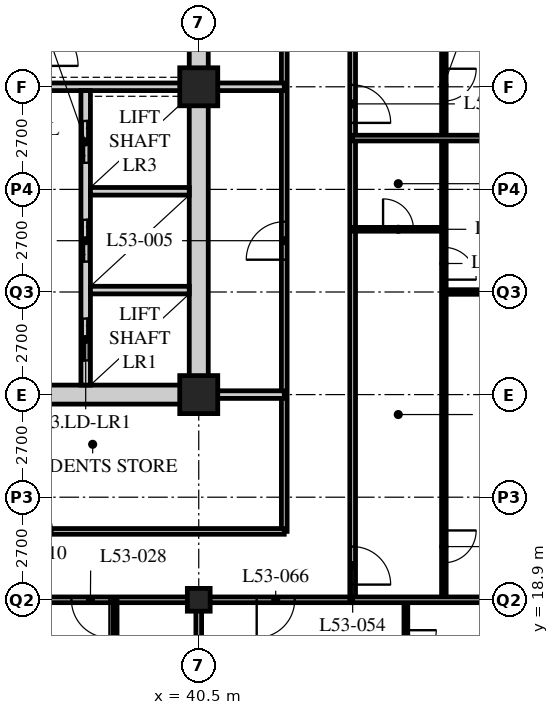
"""IFC4 building model, lengths in metres.
Left out: names, types, materials, properties, quantities, classifications, styles, units other than length and angle.
Written with IfcOpenShell. Run it as: python <this file> out.ifc"""

import sys

from ifc_helpers import new_model, si_unit, direction, frame, frame_2d, origin, origin_2d, place, context, subcontext, project, spatial, rectangle, hollow_rectangle, extrude, element, fill, save


model = new_model("IFC4")
c1 = context("Model", 3, precision=1e-05, world=origin(), true_north=direction((0.0, 1.0)))
c2 = subcontext(c1, "Body", "Model", "MODEL_VIEW")
j1 = project(units=[si_unit("LENGTHUNIT", "METRE"), si_unit("PLANEANGLEUNIT", "RADIAN")], contexts=[c1])
p1 = place(None, origin())
s1 = spatial("IfcSite", under=j1, at=p1, CompositionType="ELEMENT")
p2 = place(p1, origin())
s2 = spatial("IfcBuilding", under=s1, at=p2, CompositionType="ELEMENT")
p3 = place(p2, frame((0.0, 0.0, 206.4)))
s3 = spatial("IfcBuildingStorey", under=s2, at=p3, CompositionType="ELEMENT", Elevation=206.4)
p4 = place(p3, frame((40.5, 18.9, 0.0), z_axis=(0.0, 0.0, 1.0), x_axis=(1.0, 0.0, 0.0)))
e1 = element("IfcColumn", 1, at=p4, inside=s3, PredefinedType="COLUMN", context=c2, shape_type="SweptSolid", body=[
    extrude(hollow_rectangle(XDim=0.6, YDim=0.6, WallThickness=0.05, at=origin_2d()), origin(), (0.0, 0.0, 1.0), 3.6),
])
for number, where, z_axis, x_axis in (
    (2, (40.5, 24.3, 0.0), (0.0, 0.0, 1.0), (1.0, 0.0, 0.0)),
    (3, (40.5, 32.4, 0.0), (0.0, 0.0, 1.0), (1.0, 0.0, 0.0)),
):
    element("IfcColumn", number, at=place(p3, frame(where, z_axis=z_axis, x_axis=x_axis)), inside=s3, PredefinedType="COLUMN", context=c2, shape_type="SweptSolid", body=[
        extrude(hollow_rectangle(XDim=1.0, YDim=1.0, WallThickness=0.1, at=origin_2d()), origin(), (0.0, 0.0, 1.0), 3.6),
    ])
p5 = place(p3, frame((8.1, 18.9, 0.0), z_axis=(0.0, 0.0, 1.0), x_axis=(1.0, 0.0, 0.0)))
e4 = element("IfcWall", 4, at=p5, inside=s3, PredefinedType="PARTITIONING", context=c2, shape_type="SweptSolid", body=[
    extrude(rectangle(XDim=36.45, YDim=0.15, at=frame_2d((18.225, 0.0))), origin(), (0.0, 0.0, 1.0), 2.778),
])
p6 = place(p5, frame((4.45, 0.0, 0.0)))
e5 = element("IfcOpeningElement", 5, at=p6, cuts=e4, PredefinedType="OPENING", context=c2, shape_type="SweptSolid", body=[
    extrude(rectangle(XDim=1.0, YDim=2.1, at=frame_2d((0.5, 1.05))), frame((0.0, 0.085, 0.0), z_axis=(0.0, -1.0, 0.0), x_axis=(1.0, 0.0, 0.0)), (0.0, 0.0, 1.0), 0.17),
])
p7 = place(p5, frame((12.55, 0.0, 0.0)))
e6 = element("IfcOpeningElement", 6, at=p7, cuts=e4, PredefinedType="OPENING", context=c2, shape_type="SweptSolid", body=[
    extrude(rectangle(XDim=1.0, YDim=2.1, at=frame_2d((0.5, 1.05))), frame((0.0, 0.085, 0.0), z_axis=(0.0, -1.0, 0.0), x_axis=(1.0, 0.0, 0.0)), (0.0, 0.0, 1.0), 0.17),
])
p8 = place(p5, frame((29.05, 0.0, 0.0)))
e7 = element("IfcOpeningElement", 7, at=p8, cuts=e4, PredefinedType="OPENING", context=c2, shape_type="SweptSolid", body=[
    extrude(rectangle(XDim=1.0, YDim=2.1, at=frame_2d((0.5, 1.05))), frame((0.0, 0.085, 0.0), z_axis=(0.0, -1.0, 0.0), x_axis=(1.0, 0.0, 0.0)), (0.0, 0.0, 1.0), 0.17),
])
p9 = place(p5, frame((2.625, 0.0, 0.0)))
e8 = element("IfcOpeningElement", 8, at=p9, cuts=e4, PredefinedType="OPENING", context=c2, shape_type="SweptSolid", body=[
    extrude(rectangle(XDim=1.0, YDim=2.1, at=frame_2d((0.5, 1.05))), frame((0.0, 0.085, 0.0), z_axis=(0.0, -1.0, 0.0), x_axis=(1.0, 0.0, 0.0)), (0.0, 0.0, 1.0), 0.17),
])
p10 = place(p5, frame((33.925, 0.0, 0.0)))
e9 = element("IfcOpeningElement", 9, at=p10, cuts=e4, PredefinedType="OPENING", context=c2, shape_type="SweptSolid", body=[
    extrude(rectangle(XDim=1.0, YDim=2.1, at=frame_2d((0.5, 1.05))), frame((0.0, 0.085, 0.0), z_axis=(0.0, -1.0, 0.0), x_axis=(1.0, 0.0, 0.0)), (0.0, 0.0, 1.0), 0.17),
])
p11 = place(p3, frame((44.55, 18.9, 0.0), z_axis=(0.0, 0.0, 1.0), x_axis=(0.0, 1.0, 0.0)))
e10 = element("IfcWall", 10, at=p11, inside=s3, PredefinedType="PARTITIONING", context=c2, shape_type="SweptSolid", body=[
    extrude(rectangle(XDim=28.35, YDim=0.15, at=frame_2d((14.175, 0.0))), origin(), (0.0, 0.0, 1.0), 3.39),
])
p12 = place(p11, frame((0.4, 0.0, 0.0)))
e11 = element("IfcOpeningElement", 11, at=p12, cuts=e10, PredefinedType="OPENING", context=c2, shape_type="SweptSolid", body=[
    extrude(rectangle(XDim=1.0, YDim=2.1, at=frame_2d((0.5, 1.05))), frame((0.0, 0.085, 0.0), z_axis=(0.0, -1.0, 0.0), x_axis=(1.0, 0.0, 0.0)), (0.0, 0.0, 1.0), 0.17),
])
p13 = place(p11, frame((12.55, 0.0, 0.0)))
e12 = element("IfcOpeningElement", 12, at=p13, cuts=e10, PredefinedType="OPENING", context=c2, shape_type="SweptSolid", body=[
    extrude(rectangle(XDim=1.0, YDim=2.1, at=frame_2d((0.5, 1.05))), frame((0.0, 0.085, 0.0), z_axis=(0.0, -1.0, 0.0), x_axis=(1.0, 0.0, 0.0)), (0.0, 0.0, 1.0), 0.17),
])
p14 = place(p11, frame((26.65, 0.0, 0.0)))
e13 = element("IfcOpeningElement", 13, at=p14, cuts=e10, PredefinedType="OPENING", context=c2, shape_type="SweptSolid", body=[
    extrude(rectangle(XDim=1.0, YDim=2.1, at=frame_2d((0.5, 1.05))), frame((0.0, 0.085, 0.0), z_axis=(0.0, -1.0, 0.0), x_axis=(1.0, 0.0, 0.0)), (0.0, 0.0, 1.0), 0.17),
])
p15 = place(p3, frame((42.75, 20.7, 0.0), z_axis=(0.0, 0.0, 1.0), x_axis=(0.0, 1.0, 0.0)))
e14 = element("IfcWall", 14, at=p15, inside=s3, PredefinedType="PARTITIONING", context=c2, shape_type="SweptSolid", body=[
    extrude(rectangle(XDim=24.75, YDim=0.15, at=frame_2d((12.375, 0.0))), origin(), (0.0, 0.0, 1.0), 3.39),
])
p16 = place(p15, frame((7.15, 0.0, 0.0)))
e15 = element("IfcOpeningElement", 15, at=p16, cuts=e14, PredefinedType="OPENING", context=c2, shape_type="SweptSolid", body=[
    extrude(rectangle(XDim=1.0, YDim=2.1, at=frame_2d((0.5, 1.05))), frame((0.0, 0.085, 0.0), z_axis=(0.0, -1.0, 0.0), x_axis=(1.0, 0.0, 0.0)), (0.0, 0.0, 1.0), 0.17),
])
p17 = place(p15, frame((15.25, 0.0, 0.0)))
e16 = element("IfcOpeningElement", 16, at=p17, cuts=e14, PredefinedType="OPENING", context=c2, shape_type="SweptSolid", body=[
    extrude(rectangle(XDim=1.0, YDim=2.1, at=frame_2d((0.5, 1.05))), frame((0.0, 0.085, 0.0), z_axis=(0.0, -1.0, 0.0), x_axis=(1.0, 0.0, 0.0)), (0.0, 0.0, 1.0), 0.17),
])
p18 = place(p3, frame((29.56, 20.7, 0.0), z_axis=(0.0, 0.0, 1.0), x_axis=(1.0, 0.0, 0.0)))
e17 = element("IfcWall", 17, at=p18, inside=s3, PredefinedType="PARTITIONING", context=c2, shape_type="SweptSolid", body=[
    extrude(rectangle(XDim=13.19, YDim=0.15, at=frame_2d((6.595, 0.0))), origin(), (0.0, 0.0, 1.0), 3.39),
])
p19 = place(p18, frame((6.09, 0.0, 0.0)))
e18 = element("IfcOpeningElement", 18, at=p19, cuts=e17, PredefinedType="OPENING", context=c2, shape_type="SweptSolid", body=[
    extrude(rectangle(XDim=1.0, YDim=2.1, at=frame_2d((0.5, 1.05))), frame((0.0, 0.085, 0.0), z_axis=(0.0, -1.0, 0.0), x_axis=(1.0, 0.0, 0.0)), (0.0, 0.0, 1.0), 0.17),
])
for number, where, z_axis, x_axis in (
    (19, (40.5, 32.4, 0.0), (0.0, 0.0, 1.0), (1.0, 0.0, 0.0)),
    (20, (40.5, 24.3, 0.0), (0.0, 0.0, 1.0), (1.0, 0.0, 0.0)),
):
    element("IfcWall", number, at=place(p3, frame(where, z_axis=z_axis, x_axis=x_axis)), inside=s3, PredefinedType="SOLIDWALL", context=c2, shape_type="SweptSolid", body=[
        extrude(rectangle(XDim=2.25, YDim=0.2, at=frame_2d((1.125, 0.0))), origin(), (0.0, 0.0, 1.0), 3.39),
    ])
p20 = place(p3, frame((38.3, 18.9, 0.0), z_axis=(0.0, 0.0, 1.0), x_axis=(0.0, -1.0, 0.0)))
e21 = element("IfcWall", 21, at=p20, inside=s3, PredefinedType="PARTITIONING", context=c2, shape_type="SweptSolid", body=[
    extrude(rectangle(XDim=2.4, YDim=0.1, at=frame_2d((1.2, 0.0))), origin(), (0.0, 0.0, 1.0), 3.39),
])
p21 = place(p20, frame((1.35, 0.0, 0.0)))
e22 = element("IfcOpeningElement", 22, at=p21, cuts=e21, PredefinedType="OPENING", context=c2, shape_type="SweptSolid", body=[
    extrude(rectangle(XDim=0.8, YDim=2.1, at=frame_2d((0.4, 1.05))), frame((0.0, 0.06, 0.0), z_axis=(0.0, -1.0, 0.0), x_axis=(1.0, 0.0, 0.0)), (0.0, 0.0, 1.0), 0.12),
])
p22 = place(p3, frame((46.95, 18.9, 0.0), z_axis=(0.0, 0.0, 1.0), x_axis=(0.0, 1.0, 0.0)))
e23 = element("IfcWall", 23, at=p22, inside=s3, PredefinedType="PARTITIONING", context=c2, shape_type="SweptSolid", body=[
    extrude(rectangle(XDim=24.3, YDim=0.12, at=frame_2d((12.15, 0.0))), origin(), (0.0, 0.0, 1.0), 3.39),
])
p23 = place(p22, frame((0.975, 0.0, 0.0)))
e24 = element("IfcOpeningElement", 24, at=p23, cuts=e23, PredefinedType="OPENING", context=c2, shape_type="SweptSolid", body=[
    extrude(rectangle(XDim=0.85, YDim=2.1, at=frame_2d((0.425, 1.05))), frame((0.0, 0.07, 0.0), z_axis=(0.0, -1.0, 0.0), x_axis=(1.0, 0.0, 0.0)), (0.0, 0.0, 1.0), 0.14),
])
p24 = place(p22, frame((8.425, 0.0, 0.0)))
e25 = element("IfcOpeningElement", 25, at=p24, cuts=e23, PredefinedType="OPENING", context=c2, shape_type="SweptSolid", body=[
    extrude(rectangle(XDim=0.85, YDim=2.1, at=frame_2d((0.425, 1.05))), frame((0.0, 0.07, 0.0), z_axis=(0.0, -1.0, 0.0), x_axis=(1.0, 0.0, 0.0)), (0.0, 0.0, 1.0), 0.14),
])
p25 = place(p22, frame((13.125, 0.0, 0.0)))
e26 = element("IfcOpeningElement", 26, at=p25, cuts=e23, PredefinedType="OPENING", context=c2, shape_type="SweptSolid", body=[
    extrude(rectangle(XDim=0.85, YDim=2.1, at=frame_2d((0.425, 1.05))), frame((0.0, 0.07, 0.0), z_axis=(0.0, -1.0, 0.0), x_axis=(1.0, 0.0, 0.0)), (0.0, 0.0, 1.0), 0.14),
])
p26 = place(p22, frame((20.575, 0.0, 0.0)))
e27 = element("IfcOpeningElement", 27, at=p26, cuts=e23, PredefinedType="OPENING", context=c2, shape_type="SweptSolid", body=[
    extrude(rectangle(XDim=0.85, YDim=2.1, at=frame_2d((0.425, 1.05))), frame((0.0, 0.07, 0.0), z_axis=(0.0, -1.0, 0.0), x_axis=(1.0, 0.0, 0.0)), (0.0, 0.0, 1.0), 0.14),
])
p27 = place(p3, frame((44.55, 28.65, 0.0), z_axis=(0.0, 0.0, 1.0), x_axis=(1.0, 0.0, 0.0)))
e28 = element("IfcWall", 28, at=p27, inside=s3, PredefinedType="PARTITIONING", context=c2, shape_type="SweptSolid", body=[
    extrude(rectangle(XDim=2.4, YDim=0.1, at=frame_2d((1.2, 0.0))), origin(), (0.0, 0.0, 1.0), 3.39),
])
p28 = place(p27, frame((0.8, 0.0, 0.0)))
e29 = element("IfcOpeningElement", 29, at=p28, cuts=e28, PredefinedType="OPENING", context=c2, shape_type="SweptSolid", body=[
    extrude(rectangle(XDim=0.8, YDim=2.1, at=frame_2d((0.4, 1.05))), frame((0.0, 0.06, 0.0), z_axis=(0.0, -1.0, 0.0), x_axis=(1.0, 0.0, 0.0)), (0.0, 0.0, 1.0), 0.12),
])
p29 = place(p3, frame((46.95, 27.0, 0.0), z_axis=(0.0, 0.0, 1.0), x_axis=(1.0, 0.0, 0.0)))
e30 = element("IfcWall", 30, at=p29, inside=s3, PredefinedType="PARTITIONING", context=c2, shape_type="SweptSolid", body=[
    extrude(rectangle(XDim=9.45, YDim=0.12, at=frame_2d((4.725, 0.0))), origin(), (0.0, 0.0, 1.0), 2.778),
])
p30 = place(p3, frame((44.55, 31.05, 0.0), z_axis=(0.0, 0.0, 1.0), x_axis=(1.0, 0.0, 0.0)))
e31 = element("IfcWall", 31, at=p30, inside=s3, PredefinedType="PARTITIONING", context=c2, shape_type="SweptSolid", body=[
    extrude(rectangle(XDim=11.85, YDim=0.15, at=frame_2d((5.925, 0.0))), origin(), (0.0, 0.0, 1.0), 3.39),
])
p31 = place(p3, frame((45.95, 18.9, 0.0), z_axis=(0.0, 0.0, 1.0), x_axis=(0.0, -1.0, 0.0)))
e32 = element("IfcWall", 32, at=p31, inside=s3, PredefinedType="PARTITIONING", context=c2, shape_type="SweptSolid", body=[
    extrude(rectangle(XDim=2.4, YDim=0.1, at=frame_2d((1.2, 0.0))), origin(), (0.0, 0.0, 1.0), 3.39),
])
p32 = place(p31, frame((0.8, 0.0, 0.0)))
e33 = element("IfcOpeningElement", 33, at=p32, cuts=e32, PredefinedType="OPENING", context=c2, shape_type="SweptSolid", body=[
    extrude(rectangle(XDim=0.8, YDim=2.1, at=frame_2d((0.4, 1.05))), frame((0.0, 0.06, 0.0), z_axis=(0.0, -1.0, 0.0), x_axis=(1.0, 0.0, 0.0)), (0.0, 0.0, 1.0), 0.12),
])
p33 = place(p3, frame((44.55, 18.9, 0.0), z_axis=(0.0, 0.0, 1.0), x_axis=(1.0, 0.0, 0.0)))
e34 = element("IfcWall", 34, at=p33, inside=s3, PredefinedType="PARTITIONING", context=c2, shape_type="SweptSolid", body=[
    extrude(rectangle(XDim=7.8, YDim=0.15, at=frame_2d((3.9, 0.0))), origin(), (0.0, 0.0, 1.0), 2.778),
])
p34 = place(p3, frame((40.5, 18.9, 0.0), z_axis=(0.0, 0.0, 1.0), x_axis=(0.0, -1.0, 0.0)))
e35 = element("IfcWall", 35, at=p34, inside=s3, PredefinedType="PARTITIONING", context=c2, shape_type="SweptSolid", body=[
    extrude(rectangle(XDim=7.8, YDim=0.15, at=frame_2d((3.9, 0.0))), origin(), (0.0, 0.0, 1.0), 2.778),
])
p35 = place(p3, frame((15.95, 24.3, 0.0), z_axis=(0.0, 0.0, 1.0), x_axis=(1.0, 0.0, 0.0)))
e36 = element("IfcWall", 36, at=p35, inside=s3, PredefinedType="SOLIDWALL", context=c2, shape_type="SweptSolid", body=[
    extrude(rectangle(XDim=24.8, YDim=0.5, at=frame_2d((12.4, 0.0))), origin(), (0.0, 0.0, 1.0), 2.74),
])
p36 = place(p35, frame((11.5, 0.0, 0.0)))
e37 = element("IfcOpeningElement", 37, at=p36, cuts=e36, PredefinedType="OPENING", context=c2, shape_type="SweptSolid", body=[
    extrude(rectangle(XDim=1.8, YDim=2.4, at=frame_2d((0.9, 1.2))), frame((0.0, 0.26, 0.0), z_axis=(0.0, -1.0, 0.0), x_axis=(1.0, 0.0, 0.0)), (0.0, 0.0, 1.0), 0.52),
])
p37 = place(p3, frame((40.5, 24.55, 0.0), z_axis=(0.0, 0.0, 1.0), x_axis=(0.0, 1.0, 0.0)))
e38 = element("IfcWall", 38, at=p37, inside=s3, PredefinedType="SOLIDWALL", context=c2, shape_type="SweptSolid", body=[
    extrude(rectangle(XDim=15.7, YDim=0.5, at=frame_2d((7.85, 0.0))), origin(), (0.0, 0.0, 1.0), 2.778),
])
p38 = place(p3, frame((32.3, 32.4, 0.0), z_axis=(0.0, 0.0, 1.0), x_axis=(1.0, 0.0, 0.0)))
e39 = element("IfcWall", 39, at=p38, inside=s3, PredefinedType="SOLIDWALL", context=c2, shape_type="SweptSolid", body=[
    extrude(rectangle(XDim=7.95, YDim=0.2, at=frame_2d((3.975, 0.0))), origin(), (0.0, 0.0, 1.0), 2.778),
])
p39 = place(p3, frame((37.525, 24.55, 0.0), z_axis=(0.0, 0.0, 1.0), x_axis=(0.0, 1.0, 0.0)))
e40 = element("IfcWall", 40, at=p39, inside=s3, PredefinedType="SOLIDWALL", context=c2, shape_type="SweptSolid", body=[
    extrude(rectangle(XDim=7.75, YDim=0.25, at=frame_2d((3.875, 0.0))), origin(), (0.0, 0.0, 1.0), 3.39),
])
p40 = place(p39, frame((0.65, 0.0, 0.0)))
e41 = element("IfcOpeningElement", 41, at=p40, cuts=e40, PredefinedType="OPENING", context=c2, shape_type="SweptSolid", body=[
    extrude(rectangle(XDim=1.1, YDim=2.4, at=frame_2d((0.55, 1.2))), frame((0.0, 0.135, 0.0), z_axis=(0.0, -1.0, 0.0), x_axis=(1.0, 0.0, 0.0)), (0.0, 0.0, 1.0), 0.27),
])
p41 = place(p39, frame((3.25, 0.0, 0.0)))
e42 = element("IfcOpeningElement", 42, at=p41, cuts=e40, PredefinedType="OPENING", context=c2, shape_type="SweptSolid", body=[
    extrude(rectangle(XDim=1.1, YDim=2.4, at=frame_2d((0.55, 1.2))), frame((0.0, 0.135, 0.0), z_axis=(0.0, -1.0, 0.0), x_axis=(1.0, 0.0, 0.0)), (0.0, 0.0, 1.0), 0.27),
])
p42 = place(p39, frame((5.85, 0.0, 0.0)))
e43 = element("IfcOpeningElement", 43, at=p42, cuts=e40, PredefinedType="OPENING", context=c2, shape_type="SweptSolid", body=[
    extrude(rectangle(XDim=1.1, YDim=2.4, at=frame_2d((0.55, 1.2))), frame((0.0, 0.135, 0.0), z_axis=(0.0, -1.0, 0.0), x_axis=(1.0, 0.0, 0.0)), (0.0, 0.0, 1.0), 0.27),
])
for number, where, z_axis, x_axis in (
    (44, (37.65, 27.05, 0.0), (0.0, 0.0, 1.0), (1.0, 0.0, 0.0)),
    (45, (37.65, 29.65, 0.0), (0.0, 0.0, 1.0), (1.0, 0.0, 0.0)),
):
    element("IfcWall", number, at=place(p3, frame(where, z_axis=z_axis, x_axis=x_axis)), inside=s3, PredefinedType="SOLIDWALL", context=c2, shape_type="SweptSolid", body=[
        extrude(rectangle(XDim=2.6, YDim=0.2, at=frame_2d((1.3, 0.0))), origin(), (0.0, 0.0, 1.0), 3.39),
    ])
p43 = place(p16, origin())
e46 = element("IfcDoor", 46, at=p43, inside=s3, OperationType="SINGLE_SWING_LEFT", PredefinedType="DOOR", context=c2, shape_type="SweptSolid", body=[
    extrude(rectangle(XDim=1.0, YDim=2.1, at=frame_2d((0.5, 1.05))), frame((0.0, 0.025, 0.0), z_axis=(0.0, -1.0, 0.0), x_axis=(1.0, 0.0, 0.0)), (0.0, 0.0, 1.0), 0.05),
])
fill(e15, e46)
p44 = place(p19, origin())
e47 = element("IfcDoor", 47, at=p44, inside=s3, OperationType="SINGLE_SWING_LEFT", PredefinedType="DOOR", context=c2, shape_type="SweptSolid", body=[
    extrude(rectangle(XDim=1.0, YDim=2.1, at=frame_2d((0.5, 1.05))), frame((0.0, 0.025, 0.0), z_axis=(0.0, -1.0, 0.0), x_axis=(1.0, 0.0, 0.0)), (0.0, 0.0, 1.0), 0.05),
])
fill(e18, e47)
p45 = place(p8, origin())
e48 = element("IfcDoor", 48, at=p45, inside=s3, OperationType="SINGLE_SWING_LEFT", PredefinedType="DOOR", context=c2, shape_type="SweptSolid", body=[
    extrude(rectangle(XDim=1.0, YDim=2.1, at=frame_2d((0.5, 1.05))), frame((0.0, 0.025, 0.0), z_axis=(0.0, -1.0, 0.0), x_axis=(1.0, 0.0, 0.0)), (0.0, 0.0, 1.0), 0.05),
])
fill(e7, e48)
p46 = place(p28, origin())
e49 = element("IfcDoor", 49, at=p46, inside=s3, OperationType="SINGLE_SWING_LEFT", PredefinedType="DOOR", context=c2, shape_type="SweptSolid", body=[
    extrude(rectangle(XDim=0.8, YDim=2.1, at=frame_2d((0.4, 1.05))), frame((0.0, 0.025, 0.0), z_axis=(0.0, -1.0, 0.0), x_axis=(1.0, 0.0, 0.0)), (0.0, 0.0, 1.0), 0.05),
])
fill(e29, e49)
p47 = place(p12, origin())
e50 = element("IfcDoor", 50, at=p47, inside=s3, OperationType="SINGLE_SWING_RIGHT", PredefinedType="DOOR", context=c2, shape_type="SweptSolid", body=[
    extrude(rectangle(XDim=1.0, YDim=2.1, at=frame_2d((0.5, 1.05))), frame((0.0, 0.025, 0.0), z_axis=(0.0, -1.0, 0.0), x_axis=(1.0, 0.0, 0.0)), (0.0, 0.0, 1.0), 0.05),
])
fill(e11, e50)
p48 = place(p23, origin())
e51 = element("IfcDoor", 51, at=p48, inside=s3, OperationType="SINGLE_SWING_LEFT", PredefinedType="DOOR", context=c2, shape_type="SweptSolid", body=[
    extrude(rectangle(XDim=0.85, YDim=2.1, at=frame_2d((0.425, 1.05))), frame((0.0, 0.025, 0.0), z_axis=(0.0, -1.0, 0.0), x_axis=(1.0, 0.0, 0.0)), (0.0, 0.0, 1.0), 0.05),
])
fill(e24, e51)
p49 = place(p24, origin())
e52 = element("IfcDoor", 52, at=p49, inside=s3, OperationType="SINGLE_SWING_RIGHT", PredefinedType="DOOR", context=c2, shape_type="SweptSolid", body=[
    extrude(rectangle(XDim=0.85, YDim=2.1, at=frame_2d((0.425, 1.05))), frame((0.0, 0.025, 0.0), z_axis=(0.0, -1.0, 0.0), x_axis=(1.0, 0.0, 0.0)), (0.0, 0.0, 1.0), 0.05),
])
fill(e25, e52)
p50 = place(p13, origin())
e53 = element("IfcDoor", 53, at=p50, inside=s3, OperationType="SINGLE_SWING_RIGHT", PredefinedType="DOOR", context=c2, shape_type="SweptSolid", body=[
    extrude(rectangle(XDim=1.0, YDim=2.1, at=frame_2d((0.5, 1.05))), frame((0.0, 0.025, 0.0), z_axis=(0.0, -1.0, 0.0), x_axis=(1.0, 0.0, 0.0)), (0.0, 0.0, 1.0), 0.05),
])
fill(e12, e53)
p51 = place(p25, origin())
e54 = element("IfcDoor", 54, at=p51, inside=s3, OperationType="SINGLE_SWING_LEFT", PredefinedType="DOOR", context=c2, shape_type="SweptSolid", body=[
    extrude(rectangle(XDim=0.85, YDim=2.1, at=frame_2d((0.425, 1.05))), frame((0.0, 0.025, 0.0), z_axis=(0.0, -1.0, 0.0), x_axis=(1.0, 0.0, 0.0)), (0.0, 0.0, 1.0), 0.05),
])
fill(e26, e54)
p52 = place(p10, origin())
e55 = element("IfcDoor", 55, at=p52, inside=s3, OperationType="SINGLE_SWING_RIGHT", PredefinedType="DOOR", context=c2, shape_type="SweptSolid", body=[
    extrude(rectangle(XDim=1.0, YDim=2.1, at=frame_2d((0.5, 1.05))), frame((0.0, 0.025, 0.0), z_axis=(0.0, -1.0, 0.0), x_axis=(1.0, 0.0, 0.0)), (0.0, 0.0, 1.0), 0.05),
])
fill(e9, e55)
p53 = place(p32, origin())
e56 = element("IfcDoor", 56, at=p53, inside=s3, OperationType="SINGLE_SWING_LEFT", PredefinedType="DOOR", context=c2, shape_type="SweptSolid", body=[
    extrude(rectangle(XDim=0.8, YDim=2.1, at=frame_2d((0.4, 1.05))), frame((0.0, 0.025, 0.0), z_axis=(0.0, -1.0, 0.0), x_axis=(1.0, 0.0, 0.0)), (0.0, 0.0, 1.0), 0.05),
])
fill(e33, e56)
p54 = place(p40, origin())
e57 = element("IfcDoor", 57, at=p54, inside=s3, OperationType="DOUBLE_DOOR_SLIDING", PredefinedType="DOOR", context=c2, shape_type="SweptSolid", body=[
    extrude(rectangle(XDim=1.1, YDim=2.4, at=frame_2d((0.55, 1.2))), frame((0.0, 0.025, 0.0), z_axis=(0.0, -1.0, 0.0), x_axis=(1.0, 0.0, 0.0)), (0.0, 0.0, 1.0), 0.05),
])
fill(e41, e57)
p55 = place(p41, origin())
e58 = element("IfcDoor", 58, at=p55, inside=s3, OperationType="DOUBLE_DOOR_SLIDING", PredefinedType="DOOR", context=c2, shape_type="SweptSolid", body=[
    extrude(rectangle(XDim=1.1, YDim=2.4, at=frame_2d((0.55, 1.2))), frame((0.0, 0.025, 0.0), z_axis=(0.0, -1.0, 0.0), x_axis=(1.0, 0.0, 0.0)), (0.0, 0.0, 1.0), 0.05),
])
fill(e42, e58)
p56 = place(p42, origin())
e59 = element("IfcDoor", 59, at=p56, inside=s3, OperationType="DOUBLE_DOOR_SLIDING", PredefinedType="DOOR", context=c2, shape_type="SweptSolid", body=[
    extrude(rectangle(XDim=1.1, YDim=2.4, at=frame_2d((0.55, 1.2))), frame((0.0, 0.025, 0.0), z_axis=(0.0, -1.0, 0.0), x_axis=(1.0, 0.0, 0.0)), (0.0, 0.0, 1.0), 0.05),
])
fill(e43, e59)
save(model, sys.argv[1])
